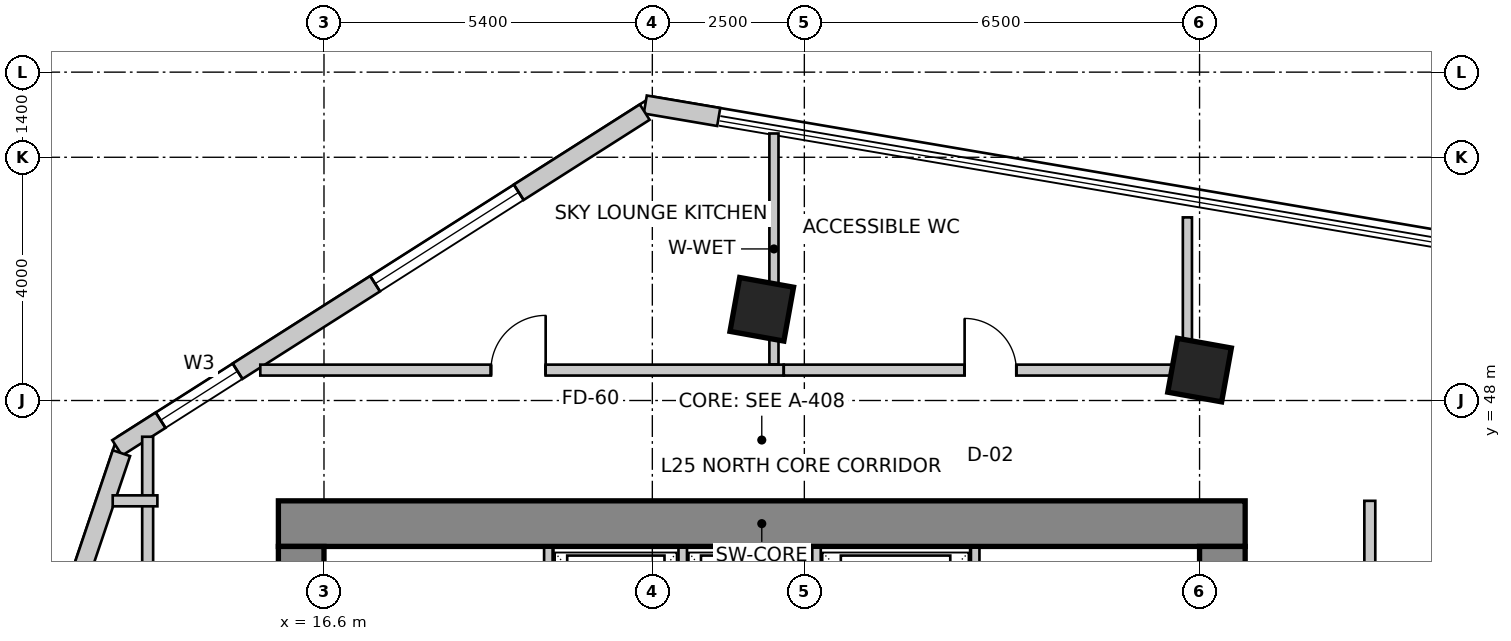
"""IFC4 building model, lengths in metres.
Left out: names, types, materials, properties, quantities, classifications, styles, units other than length and angle.
Written with IfcOpenShell. Run it as: python <this file> out.ifc"""

import sys

from ifc_helpers import new_model, si_unit, direction, frame, frame_2d, origin, origin_2d, place, context, subcontext, project, spatial, rectangle, extrude, source, transform, mapped, element, fill, save


model = new_model("IFC4")
c1 = context("Model", 3, precision=1e-05, world=origin(), true_north=direction((0.0, 1.0)))
c2 = subcontext(c1, "Body", "Model", "MODEL_VIEW")
j1 = project(units=[si_unit("LENGTHUNIT", "METRE"), si_unit("PLANEANGLEUNIT", "RADIAN")], contexts=[c1])
p1 = place(None, origin())
s1 = spatial("IfcSite", under=j1, at=p1, CompositionType="ELEMENT")
p2 = place(p1, origin())
s2 = spatial("IfcBuilding", under=s1, at=p2, CompositionType="ELEMENT")
p3 = place(p2, frame((0.0, 0.0, 105.4)))
s3 = spatial("IfcBuildingStorey", under=s2, at=p3, CompositionType="ELEMENT", Elevation=105.4)
p4 = place(p3, frame((15.85, 45.975, 0.0), z_axis=(0.0, 0.0, 1.0), x_axis=(1.0, 0.0, 0.0)))
e1 = element("IfcWall", 1, at=p4, inside=s3, PredefinedType="SHEAR", context=c2, shape_type="SweptSolid", body=[
    extrude(rectangle(XDim=15.9, YDim=0.75, at=frame_2d((7.95, 0.0))), origin(), (0.0, 0.0, 1.0), 5.2),
])
p5 = place(p3, frame((16.225, 34.2, 0.0), z_axis=(0.0, 0.0, 1.0), x_axis=(0.0, 1.0, 0.0)))
e2 = element("IfcWall", 2, at=p5, inside=s3, PredefinedType="SHEAR", context=c2, shape_type="SweptSolid", body=[
    extrude(rectangle(XDim=11.4, YDim=0.75, at=frame_2d((5.7, 0.0))), origin(), (0.0, 0.0, 1.0), 5.2),
])
m1 = source(origin(), c2, "Body", "SweptSolid", [
    extrude(rectangle(XDim=1.1, YDim=2.15, at=frame_2d((0.55, 1.075))), frame((0.0, 0.385, 0.0), z_axis=(0.0, -1.0, 0.0), x_axis=(1.0, 0.0, 0.0)), (0.0, 0.0, 1.0), 0.77),
])
p6 = place(p5, frame((7.15, 0.0, 0.0)))
e3 = element("IfcOpeningElement", 3, at=p6, cuts=e2, PredefinedType="OPENING", context=c2, shape_type="MappedRepresentation", body=[
    mapped(m1, transform((0.0, 0.0, 0.0), scale=1.0)),
])
p7 = place(p3, frame((31.375, 34.2, 0.0), z_axis=(0.0, 0.0, 1.0), x_axis=(0.0, 1.0, 0.0)))
e4 = element("IfcWall", 4, at=p7, inside=s3, PredefinedType="SHEAR", context=c2, shape_type="SweptSolid", body=[
    extrude(rectangle(XDim=11.4, YDim=0.75, at=frame_2d((5.7, 0.0))), origin(), (0.0, 0.0, 1.0), 5.2),
])
p8 = place(p7, frame((7.35, 0.0, 0.0)))
e5 = element("IfcOpeningElement", 5, at=p8, cuts=e4, PredefinedType="OPENING", context=c2, shape_type="MappedRepresentation", body=[
    mapped(m1, transform((0.0, 0.0, 0.0), scale=1.0)),
])
m2 = source(origin(), c2, "Body", "SweptSolid", [
    extrude(rectangle(XDim=0.9, YDim=0.9, at=origin_2d()), origin(), (0.0, 0.0, 1.0), 5.2),
])
for number, where, z_axis, x_axis in (
    (6, (23.8, 49.5, 0.0), (0.0, 0.0, 1.0), (0.984, -0.177, 0.0)),
    (7, (31.0, 48.5, 0.0), (0.0, 0.0, 1.0), (0.984, -0.177, 0.0)),
):
    element("IfcColumn", number, at=place(p3, frame(where, z_axis=z_axis, x_axis=x_axis)), inside=s3, PredefinedType="COLUMN", context=c2, shape_type="MappedRepresentation", body=[
        mapped(m2, transform((0.0, 0.0, 0.0), scale=1.0)),
    ])
p9 = place(p3, frame((23.092, 52.662, 0.0), z_axis=(0.0, 0.0, 1.0), x_axis=(-0.98582257249, 0.167791106941, 0.0)))
e8 = element("IfcWall", 8, at=p9, inside=s3, PredefinedType="SOLIDWALL", context=c2, shape_type="SweptSolid", body=[
    extrude(rectangle(XDim=1.225, YDim=0.3, at=frame_2d((0.613, 0.0))), origin(), (0.0, 0.0, 1.0), 4.95),
])
p10 = place(p3, frame((21.875, 52.742, 0.0), z_axis=(0.0, 0.0, 1.0), x_axis=(-0.843662465249, -0.536873956092, 0.0)))
e9 = element("IfcWall", 9, at=p10, inside=s3, PredefinedType="SOLIDWALL", context=c2, shape_type="SweptSolid", body=[
    extrude(rectangle(XDim=10.284, YDim=0.3, at=frame_2d((5.142, 0.0))), origin(), (0.0, 0.0, 1.0), 4.95),
])
m3 = source(origin(), c2, "Body", "SweptSolid", [
    extrude(rectangle(XDim=2.8, YDim=2.4, at=frame_2d((1.4, 1.2))), frame((0.0, 0.16, 0.0), z_axis=(0.0, -1.0, 0.0), x_axis=(1.0, 0.0, 0.0)), (0.0, 0.0, 1.0), 0.32),
])
p11 = place(p10, frame((2.456, 0.0, 0.85)))
e10 = element("IfcOpeningElement", 10, at=p11, cuts=e9, PredefinedType="OPENING", context=c2, shape_type="MappedRepresentation", body=[
    mapped(m3, transform((0.0, 0.0, 0.0), scale=1.0)),
])
m4 = source(origin(), c2, "Body", "SweptSolid", [
    extrude(rectangle(XDim=1.5, YDim=1.8, at=frame_2d((0.75, 0.9))), frame((0.0, 0.16, 0.0), z_axis=(0.0, -1.0, 0.0), x_axis=(1.0, 0.0, 0.0)), (0.0, 0.0, 1.0), 0.32),
])
p12 = place(p10, frame((7.937, 0.0, 0.85)))
e11 = element("IfcOpeningElement", 11, at=p12, cuts=e9, PredefinedType="OPENING", context=c2, shape_type="MappedRepresentation", body=[
    mapped(m4, transform((0.0, 0.0, 0.0), scale=1.0)),
])
p13 = place(p3, frame((13.269, 47.134, 0.0), z_axis=(0.0, 0.0, 1.0), x_axis=(-0.319929596295, -0.947441319246, 0.0)))
e12 = element("IfcWall", 12, at=p13, inside=s3, PredefinedType="SOLIDWALL", context=c2, shape_type="SweptSolid", body=[
    extrude(rectangle(XDim=16.134, YDim=0.3, at=frame_2d((8.067, 0.0))), origin(), (0.0, 0.0, 1.0), 4.95),
])
m5 = source(origin(), c2, "Body", "SweptSolid", [
    extrude(rectangle(XDim=2.4, YDim=2.2, at=frame_2d((1.2, 1.1))), frame((0.0, 0.16, 0.0), z_axis=(0.0, -1.0, 0.0), x_axis=(1.0, 0.0, 0.0)), (0.0, 0.0, 1.0), 0.32),
])
p14 = place(p13, frame((2.276, 0.0, 0.85)))
e13 = element("IfcOpeningElement", 13, at=p14, cuts=e12, PredefinedType="OPENING", context=c2, shape_type="MappedRepresentation", body=[
    mapped(m5, transform((0.0, 0.0, 0.0), scale=1.0)),
])
p15 = place(p13, frame((7.011, 0.0, 0.85)))
e14 = element("IfcOpeningElement", 14, at=p15, cuts=e12, PredefinedType="OPENING", context=c2, shape_type="MappedRepresentation", body=[
    mapped(m3, transform((0.0, 0.0, 0.0), scale=1.0)),
])
p16 = place(p13, frame((12.147, 0.0, 0.85)))
e15 = element("IfcOpeningElement", 15, at=p16, cuts=e12, PredefinedType="OPENING", context=c2, shape_type="MappedRepresentation", body=[
    mapped(m5, transform((0.0, 0.0, 0.0), scale=1.0)),
])
for number, where, z_axis, x_axis in (
    (16, (20.29, 43.28, 0.0), (0.0, 0.0, 1.0), (0.0, 1.0, 0.0)),
    (17, (27.31, 43.28, 0.0), (0.0, 0.0, 1.0), (0.0, 1.0, 0.0)),
):
    element("IfcWall", number, at=place(p3, frame(where, z_axis=z_axis, x_axis=x_axis)), inside=s3, PredefinedType="SOLIDWALL", context=c2, shape_type="SweptSolid", body=[
        extrude(rectangle(XDim=2.3, YDim=0.14, at=frame_2d((1.15, 0.0))), origin(), (0.0, 0.0, 1.0), 4.95),
    ])
for number, where, z_axis, x_axis in (
    (18, (22.5, 43.02, 0.0), (0.0, 0.0, 1.0), (0.0, 1.0, 0.0)),
    (19, (24.7, 43.02, 0.0), (0.0, 0.0, 1.0), (0.0, 1.0, 0.0)),
):
    element("IfcWall", number, at=place(p3, frame(where, z_axis=z_axis, x_axis=x_axis)), inside=s3, PredefinedType="SOLIDWALL", context=c2, shape_type="SweptSolid", body=[
        extrude(rectangle(XDim=2.56, YDim=0.14, at=frame_2d((1.28, 0.0))), origin(), (0.0, 0.0, 1.0), 4.95),
    ])
p17 = place(p3, frame((13.7, 33.544, 0.0), z_axis=(0.0, 0.0, 1.0), x_axis=(0.0, 1.0, 0.0)))
e20 = element("IfcWall", 20, at=p17, inside=s3, PredefinedType="PARTITIONING", context=c2, shape_type="SweptSolid", body=[
    extrude(rectangle(XDim=13.86, YDim=0.18, at=frame_2d((6.93, 0.0))), origin(), (0.0, 0.0, 1.0), 4.092),
])
m6 = source(origin(), c2, "Body", "SweptSolid", [
    extrude(rectangle(XDim=0.9, YDim=2.15, at=frame_2d((0.45, 1.075))), frame((0.0, 0.1, 0.0), z_axis=(0.0, -1.0, 0.0), x_axis=(1.0, 0.0, 0.0)), (0.0, 0.0, 1.0), 0.2),
])
p18 = place(p17, frame((4.253, 0.0, 0.0)))
e21 = element("IfcOpeningElement", 21, at=p18, cuts=e20, PredefinedType="OPENING", context=c2, shape_type="MappedRepresentation", body=[
    mapped(m6, transform((0.0, 0.0, 0.0), scale=1.0)),
])
p19 = place(p3, frame((13.86, 46.35, 0.0), z_axis=(0.0, 0.0, 1.0), x_axis=(-1.0, 0.0, 0.0)))
e22 = element("IfcWall", 22, at=p19, inside=s3, PredefinedType="PARTITIONING", context=c2, shape_type="SweptSolid", body=[
    extrude(rectangle(XDim=0.735, YDim=0.18, at=frame_2d((0.367, 0.0))), origin(), (0.0, 0.0, 1.0), 4.95),
])
p20 = place(p3, frame((15.552, 48.5, 0.0), z_axis=(0.0, 0.0, 1.0), x_axis=(1.0, 0.0, 0.0)))
e23 = element("IfcWall", 23, at=p20, inside=s3, PredefinedType="PARTITIONING", context=c2, shape_type="SweptSolid", body=[
    extrude(rectangle(XDim=8.607, YDim=0.18, at=frame_2d((4.304, 0.0))), origin(), (0.0, 0.0, 1.0), 4.619),
])
p21 = place(p20, frame((3.793, 0.0, 0.0)))
e24 = element("IfcOpeningElement", 24, at=p21, cuts=e23, PredefinedType="OPENING", context=c2, shape_type="MappedRepresentation", body=[
    mapped(m6, transform((0.0, 0.0, 0.0), scale=1.0)),
])
p22 = place(p3, frame((24.162, 48.5, 0.0), z_axis=(0.0, 0.0, 1.0), x_axis=(1.0, 0.0, 0.0)))
e25 = element("IfcWall", 25, at=p22, inside=s3, PredefinedType="PARTITIONING", context=c2, shape_type="SweptSolid", body=[
    extrude(rectangle(XDim=6.798, YDim=0.18, at=frame_2d((3.399, 0.0))), origin(), (0.0, 0.0, 1.0), 4.092),
])
m7 = source(origin(), c2, "Body", "SweptSolid", [
    extrude(rectangle(XDim=0.85, YDim=2.15, at=frame_2d((0.425, 1.075))), frame((0.0, 0.1, 0.0), z_axis=(0.0, -1.0, 0.0), x_axis=(1.0, 0.0, 0.0)), (0.0, 0.0, 1.0), 0.2),
])
p23 = place(p22, frame((2.974, 0.0, 0.0)))
e26 = element("IfcOpeningElement", 26, at=p23, cuts=e25, PredefinedType="OPENING", context=c2, shape_type="MappedRepresentation", body=[
    mapped(m7, transform((0.0, 0.0, 0.0), scale=1.0)),
])
p24 = place(p3, frame((33.8, 46.35, 0.0), z_axis=(0.0, 0.0, 1.0), x_axis=(0.0, -1.0, 0.0)))
e27 = element("IfcWall", 27, at=p24, inside=s3, PredefinedType="PARTITIONING", context=c2, shape_type="SweptSolid", body=[
    extrude(rectangle(XDim=10.15, YDim=0.18, at=frame_2d((5.075, 0.0))), origin(), (0.0, 0.0, 1.0), 4.479),
])
m8 = source(origin(), c2, "Body", "SweptSolid", [
    extrude(rectangle(XDim=1.6, YDim=2.15, at=frame_2d((0.8, 1.075))), frame((0.0, 0.1, 0.0), z_axis=(0.0, -1.0, 0.0), x_axis=(1.0, 0.0, 0.0)), (0.0, 0.0, 1.0), 0.2),
])
p25 = place(p24, frame((4.275, 0.0, 0.0)))
e28 = element("IfcOpeningElement", 28, at=p25, cuts=e27, PredefinedType="OPENING", context=c2, shape_type="MappedRepresentation", body=[
    mapped(m8, transform((0.0, 0.0, 0.0), scale=1.0)),
])
p26 = place(p3, frame((24.0, 52.391, 0.0), z_axis=(0.0, 0.0, 1.0), x_axis=(0.0, -1.0, 0.0)))
e29 = element("IfcWall", 29, at=p26, inside=s3, PredefinedType="PARTITIONING", context=c2, shape_type="SweptSolid", body=[
    extrude(rectangle(XDim=3.797, YDim=0.15, at=frame_2d((1.898, 0.0))), origin(), (0.0, 0.0, 1.0), 4.092),
])
p27 = place(p3, frame((30.8, 51.011, 0.0), z_axis=(0.0, 0.0, 1.0), x_axis=(0.0, -1.0, 0.0)))
e30 = element("IfcWall", 30, at=p27, inside=s3, PredefinedType="PARTITIONING", context=c2, shape_type="SweptSolid", body=[
    extrude(rectangle(XDim=2.292, YDim=0.15, at=frame_2d((1.146, 0.0))), origin(), (0.0, 0.0, 1.0), 4.95),
])
m9 = source(origin(), c2, "Body", "SweptSolid", [
    extrude(rectangle(XDim=2.8, YDim=2.4, at=frame_2d((1.4, 1.2))), frame((0.0, -0.015, 0.0), z_axis=(0.0, -1.0, 0.0), x_axis=(1.0, 0.0, 0.0)), (0.0, 0.0, 1.0), 0.06),
])
p28 = place(p11, origin())
e31 = element("IfcWindow", 31, at=p28, inside=s3, PartitioningType="SINGLE_PANEL", PredefinedType="WINDOW", context=c2, shape_type="MappedRepresentation", body=[
    mapped(m9, transform((0.0, 0.0, 0.0), scale=1.0)),
])
fill(e10, e31)
m10 = source(origin(), c2, "Body", "SweptSolid", [
    extrude(rectangle(XDim=1.5, YDim=1.8, at=frame_2d((0.75, 0.9))), frame((0.0, -0.015, 0.0), z_axis=(0.0, -1.0, 0.0), x_axis=(1.0, 0.0, 0.0)), (0.0, 0.0, 1.0), 0.06),
])
p29 = place(p12, origin())
e32 = element("IfcWindow", 32, at=p29, inside=s3, PartitioningType="SINGLE_PANEL", PredefinedType="WINDOW", context=c2, shape_type="MappedRepresentation", body=[
    mapped(m10, transform((0.0, 0.0, 0.0), scale=1.0)),
])
fill(e11, e32)
m11 = source(origin(), c2, "Body", "SweptSolid", [
    extrude(rectangle(XDim=0.9, YDim=2.15, at=frame_2d((0.45, 1.075))), frame((0.0, 0.025, 0.0), z_axis=(0.0, -1.0, 0.0), x_axis=(1.0, 0.0, 0.0)), (0.0, 0.0, 1.0), 0.05),
])
p30 = place(p21, origin())
e33 = element("IfcDoor", 33, at=p30, inside=s3, OperationType="SINGLE_SWING_RIGHT", PredefinedType="DOOR", context=c2, shape_type="MappedRepresentation", body=[
    mapped(m11, transform((0.0, 0.0, 0.0), scale=1.0)),
])
fill(e24, e33)
m12 = source(origin(), c2, "Body", "SweptSolid", [
    extrude(rectangle(XDim=0.85, YDim=2.15, at=frame_2d((0.425, 1.075))), frame((0.0, 0.025, 0.0), z_axis=(0.0, -1.0, 0.0), x_axis=(1.0, 0.0, 0.0)), (0.0, 0.0, 1.0), 0.05),
])
p31 = place(p23, origin())
e34 = element("IfcDoor", 34, at=p31, inside=s3, OperationType="SINGLE_SWING_LEFT", PredefinedType="DOOR", context=c2, shape_type="MappedRepresentation", body=[
    mapped(m12, transform((0.0, 0.0, 0.0), scale=1.0)),
])
fill(e26, e34)
save(model, sys.argv[1])
